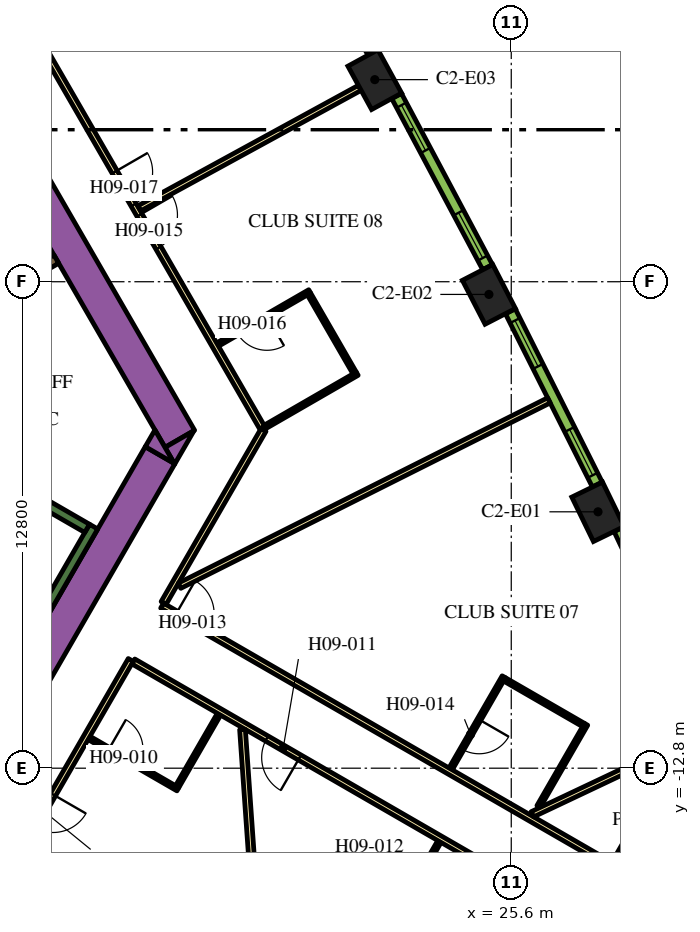
"""IFC4 building model, lengths in metres.
Left out: names, types, materials, properties, quantities, classifications, styles, units other than length and angle.
Written with IfcOpenShell. Run it as: python <this file> out.ifc"""

import sys

from ifc_helpers import new_model, si_unit, direction, frame, frame_2d, origin, origin_2d, place, context, subcontext, project, spatial, polyline, rectangle, outline, extrude, element, fill, save


model = new_model("IFC4")
c1 = context("Model", 3, precision=1e-05, world=origin(), true_north=direction((0.0, 1.0)))
c2 = subcontext(c1, "Body", "Model", "MODEL_VIEW")
j1 = project(units=[si_unit("LENGTHUNIT", "METRE"), si_unit("PLANEANGLEUNIT", "RADIAN")], contexts=[c1])
p1 = place(None, origin())
s1 = spatial("IfcSite", under=j1, at=p1, CompositionType="ELEMENT")
p2 = place(p1, origin())
s2 = spatial("IfcBuilding", under=s1, at=p2, CompositionType="ELEMENT")
p3 = place(p2, frame((0.0, 0.0, 122.7)))
s3 = spatial("IfcBuildingStorey", under=s2, at=p3, CompositionType="ELEMENT", Elevation=122.7)
p4 = place(p3, frame((29.097, -16.799, 0.0), z_axis=(0.0, 0.0, 1.0), x_axis=(0.866025403784, -0.5, 0.0)))
e1 = element("IfcColumn", 1, at=p4, inside=s3, PredefinedType="COLUMN", context=c2, shape_type="SweptSolid", body=[
    extrude(rectangle(XDim=3.0, YDim=3.0, at=origin_2d()), origin(), (0.0, 0.0, 1.0), 3.9),
])
for number, where, z_axis, x_axis in (
    (2, (27.883, -6.054, 0.0), (0.0, 0.0, 1.0), (-0.438, 0.899, 0.0)),
    (3, (25.012, -0.334, 0.0), (0.0, 0.0, 1.0), (-0.459, 0.888, 0.0)),
    (4, (22.009, 5.317, 0.0), (0.0, 0.0, 1.0), (-0.48, 0.877, 0.0)),
):
    element("IfcColumn", number, at=place(p3, frame(where, z_axis=z_axis, x_axis=x_axis)), inside=s3, PredefinedType="COLUMN", context=c2, shape_type="SweptSolid", body=[
        extrude(rectangle(XDim=1.3, YDim=0.9, at=origin_2d()), origin(), (0.0, 0.0, 1.0), 3.9),
    ])
p5 = place(p3, frame((6.776, 13.364, 0.0), z_axis=(0.0, 0.0, 1.0), x_axis=(0.500004177138, -0.8660229921, 0.0)))
e5 = element("IfcWall", 5, at=p5, inside=s3, PredefinedType="SOLIDWALL", context=c2, shape_type="SweptSolid", body=[
    extrude(rectangle(XDim=20.204, YDim=0.9, at=frame_2d((10.102, 0.0))), origin(), (0.0, 0.0, 1.0), 3.9),
])
p6 = place(p3, origin())
e6 = element("IfcWall", 6, at=p6, inside=s3, PredefinedType="SOLIDWALL", context=c2, shape_type="SweptSolid", body=[
    extrude(outline(polyline([(16.743, -4.8), (16.489, -4.36), (17.251, -3.92), (16.743, -4.8)])), origin(), (0.0, 0.0, 1.0), 3.9),
])
p7 = place(p3, frame((11.943, -12.214, 0.0), z_axis=(0.0, 0.0, 1.0), x_axis=(0.49998092645, 0.866036415623, 0.0)))
e7 = element("IfcWall", 7, at=p7, inside=s3, PredefinedType="SOLIDWALL", context=c2, shape_type="SweptSolid", body=[
    extrude(rectangle(XDim=8.83, YDim=0.9, at=frame_2d((4.415, 0.0))), origin(), (0.0, 0.0, 1.0), 3.9),
])
e8 = element("IfcWall", 8, at=p6, inside=s3, PredefinedType="SOLIDWALL", context=c2, shape_type="SweptSolid", body=[
    extrude(outline(polyline([(16.223, -3.9), (16.732, -4.78), (15.969, -4.34), (16.223, -3.9)])), origin(), (0.0, 0.0, 1.0), 3.9),
])
p8 = place(p3, frame((12.885, -9.431, 0.0), z_axis=(0.0, 0.0, 1.0), x_axis=(0.500020560727, 0.866013532718, 0.0)))
e9 = element("IfcWall", 9, at=p8, inside=s3, PredefinedType="SOLIDWALL", context=c2, shape_type="SweptSolid", body=[
    extrude(rectangle(XDim=3.45, YDim=0.25, at=frame_2d((1.725, 0.0))), origin(), (0.0, 0.0, 1.0), 3.9),
])
p9 = place(p3, frame((8.334, -2.964, 0.0), z_axis=(0.0, 0.0, 1.0), x_axis=(0.866016039709, -0.500016218704, 0.0)))
e10 = element("IfcWall", 10, at=p9, inside=s3, PredefinedType="SOLIDWALL", context=c2, shape_type="SweptSolid", body=[
    extrude(rectangle(XDim=7.05, YDim=0.25, at=frame_2d((3.525, 0.0))), origin(), (0.0, 0.0, 1.0), 3.9),
])
p10 = place(p3, frame((13.629, 0.594, 0.0), z_axis=(0.0, 0.0, 1.0), x_axis=(-0.86602790099, -0.499995674689, 0.0)))
e11 = element("IfcWall", 11, at=p10, inside=s3, PredefinedType="SOLIDWALL", context=c2, shape_type="SweptSolid", body=[
    extrude(rectangle(XDim=3.146, YDim=0.25, at=frame_2d((1.573, 0.0))), origin(), (0.0, 0.0, 1.0), 3.9),
])
p11 = place(p3, frame((16.412, -8.523, 0.0), z_axis=(0.0, 0.0, 1.0), x_axis=(0.866025629663, -0.499999608766, 0.0)))
e12 = element("IfcWall", 12, at=p11, inside=s3, PredefinedType="PARTITIONING", context=c2, shape_type="SweptSolid", body=[
    extrude(rectangle(XDim=13.624, YDim=0.15, at=frame_2d((6.812, 0.0))), origin(), (0.0, 0.0, 1.0), 2.75),
])
p12 = place(p11, frame((0.426, 0.0, 0.0)))
e13 = element("IfcOpeningElement", 13, at=p12, cuts=e12, PredefinedType="OPENING", context=c2, shape_type="SweptSolid", body=[
    extrude(rectangle(XDim=1.0, YDim=2.1, at=frame_2d((0.5, 1.05))), frame((0.0, 0.085, 0.0), z_axis=(0.0, -1.0, 0.0), x_axis=(1.0, 0.0, 0.0)), (0.0, 0.0, 1.0), 0.17),
])
p13 = place(p3, frame((19.081, -3.9, 0.0), z_axis=(0.0, 0.0, 1.0), x_axis=(-0.499974327079, -0.866040225545, 0.0)))
e14 = element("IfcWall", 14, at=p13, inside=s3, PredefinedType="PARTITIONING", context=c2, shape_type="SweptSolid", body=[
    extrude(rectangle(XDim=5.258, YDim=0.15, at=frame_2d((2.629, 0.0))), origin(), (0.0, 0.0, 1.0), 2.75),
])
p14 = place(p3, frame((6.163, 18.475, 0.0), z_axis=(0.0, 0.0, 1.0), x_axis=(0.500001317485, -0.866024643133, 0.0)))
e15 = element("IfcWall", 15, at=p14, inside=s3, PredefinedType="PARTITIONING", context=c2, shape_type="SweptSolid", body=[
    extrude(rectangle(XDim=25.767, YDim=0.15, at=frame_2d((12.883, 0.0))), origin(), (0.0, 0.0, 1.0), 2.75),
])
p15 = place(p14, frame((19.306, 0.0, 0.0)))
e16 = element("IfcOpeningElement", 16, at=p15, cuts=e15, PredefinedType="OPENING", context=c2, shape_type="SweptSolid", body=[
    extrude(rectangle(XDim=1.0, YDim=2.1, at=frame_2d((0.5, 1.05))), frame((0.0, 0.085, 0.0), z_axis=(0.0, -1.0, 0.0), x_axis=(1.0, 0.0, 0.0)), (0.0, 0.0, 1.0), 0.17),
])
p16 = place(p14, frame((17.999, 0.0, 0.0)))
e17 = element("IfcOpeningElement", 17, at=p16, cuts=e15, PredefinedType="OPENING", context=c2, shape_type="SweptSolid", body=[
    extrude(rectangle(XDim=1.0, YDim=2.1, at=frame_2d((0.5, 1.05))), frame((0.0, 0.085, 0.0), z_axis=(0.0, -1.0, 0.0), x_axis=(1.0, 0.0, 0.0)), (0.0, 0.0, 1.0), 0.17),
])
p17 = place(p14, frame((0.596, 0.0, 0.0)))
e18 = element("IfcOpeningElement", 18, at=p17, cuts=e15, PredefinedType="OPENING", context=c2, shape_type="SweptSolid", body=[
    extrude(rectangle(XDim=1.0, YDim=2.1, at=frame_2d((0.5, 1.05))), frame((0.0, 0.085, 0.0), z_axis=(0.0, -1.0, 0.0), x_axis=(1.0, 0.0, 0.0)), (0.0, 0.0, 1.0), 0.17),
])
p18 = place(p3, frame((15.587, -9.952, 0.0), z_axis=(0.0, 0.0, 1.0), x_axis=(-0.500016618951, -0.866015808616, 0.0)))
e19 = element("IfcWall", 19, at=p18, inside=s3, PredefinedType="PARTITIONING", context=c2, shape_type="SweptSolid", body=[
    extrude(rectangle(XDim=5.268, YDim=0.15, at=frame_2d((2.634, 0.0))), origin(), (0.0, 0.0, 1.0), 2.75),
])
p19 = place(p18, frame((4.088, 0.0, 0.0)))
e20 = element("IfcOpeningElement", 20, at=p19, cuts=e19, PredefinedType="OPENING", context=c2, shape_type="SweptSolid", body=[
    extrude(rectangle(XDim=1.0, YDim=2.1, at=frame_2d((0.5, 1.05))), frame((0.0, 0.085, 0.0), z_axis=(0.0, -1.0, 0.0), x_axis=(1.0, 0.0, 0.0)), (0.0, 0.0, 1.0), 0.17),
])
p20 = place(p3, frame((27.386, -16.764, 0.0), z_axis=(0.0, 0.0, 1.0), x_axis=(-0.866022585856, 0.500004880763, 0.0)))
e21 = element("IfcWall", 21, at=p20, inside=s3, PredefinedType="PARTITIONING", context=c2, shape_type="SweptSolid", body=[
    extrude(rectangle(XDim=13.544, YDim=0.15, at=frame_2d((6.772, 0.0))), origin(), (0.0, 0.0, 1.0), 2.75),
])
p21 = place(p20, frame((8.491, 0.0, 0.0)))
e22 = element("IfcOpeningElement", 22, at=p21, cuts=e21, PredefinedType="OPENING", context=c2, shape_type="SweptSolid", body=[
    extrude(rectangle(XDim=1.0, YDim=2.1, at=frame_2d((0.5, 1.05))), frame((0.0, 0.085, 0.0), z_axis=(0.0, -1.0, 0.0), x_axis=(1.0, 0.0, 0.0)), (0.0, 0.0, 1.0), 0.17),
])
p22 = place(p3, frame((21.614, 5.102, 0.0), z_axis=(0.0, 0.0, 1.0), x_axis=(-0.877484555087, -0.479604895287, 0.0)))
e23 = element("IfcWall", 23, at=p22, inside=s3, PredefinedType="PARTITIONING", context=c2, shape_type="SweptSolid", body=[
    extrude(rectangle(XDim=6.611, YDim=0.15, at=frame_2d((3.306, 0.0))), origin(), (0.0, 0.0, 1.0), 2.75),
])
p23 = place(p3, frame((26.591, -3.122, 0.0), z_axis=(0.0, 0.0, 1.0), x_axis=(-0.893766213273, -0.448533115847, 0.0)))
e24 = element("IfcWall", 24, at=p23, inside=s3, PredefinedType="PARTITIONING", context=c2, shape_type="SweptSolid", body=[
    extrude(rectangle(XDim=10.875, YDim=0.15, at=frame_2d((5.438, 0.0))), origin(), (0.0, 0.0, 1.0), 2.75),
])
p24 = place(p3, frame((19.153, -20.671, 0.0), z_axis=(0.0, 0.0, 1.0), x_axis=(-0.070070736723, 0.997542025107, 0.0)))
e25 = element("IfcWall", 25, at=p24, inside=s3, PredefinedType="PARTITIONING", context=c2, shape_type="SweptSolid", body=[
    extrude(rectangle(XDim=8.909, YDim=0.15, at=frame_2d((4.455, 0.0))), origin(), (0.0, 0.0, 1.0), 2.75),
])
p25 = place(p3, frame((30.231, -12.085, 0.0), z_axis=(0.0, 0.0, 1.0), x_axis=(-0.904001132572, -0.427530060122, 0.0)))
e26 = element("IfcWall", 26, at=p25, inside=s3, PredefinedType="PARTITIONING", context=c2, shape_type="SweptSolid", body=[
    extrude(rectangle(XDim=4.51, YDim=0.15, at=frame_2d((2.255, 0.0))), origin(), (0.0, 0.0, 1.0), 2.75),
])
p26 = place(p3, frame((14.49, -12.003, 0.0), z_axis=(0.0, 0.0, 1.0), x_axis=(0.866059108428, -0.4999416173, 0.0)))
e27 = element("IfcWall", 27, at=p26, inside=s3, PredefinedType="PARTITIONING", context=c2, shape_type="SweptSolid", body=[
    extrude(rectangle(XDim=2.7, YDim=0.1, at=frame_2d((1.35, 0.0))), origin(), (0.0, 0.0, 1.0), 2.75),
])
p27 = place(p26, frame((0.6, 0.0, 0.0)))
e28 = element("IfcOpeningElement", 28, at=p27, cuts=e27, PredefinedType="OPENING", context=c2, shape_type="SweptSolid", body=[
    extrude(rectangle(XDim=0.9, YDim=2.1, at=frame_2d((0.45, 1.05))), frame((0.0, 0.06, 0.0), z_axis=(0.0, -1.0, 0.0), x_axis=(1.0, 0.0, 0.0)), (0.0, 0.0, 1.0), 0.12),
])
p28 = place(p3, frame((16.81, -13.285, 0.0), z_axis=(0.0, 0.0, 1.0), x_axis=(0.499994660107, 0.866028486751, 0.0)))
e29 = element("IfcWall", 29, at=p28, inside=s3, PredefinedType="PARTITIONING", context=c2, shape_type="SweptSolid", body=[
    extrude(rectangle(XDim=2.2, YDim=0.1, at=frame_2d((1.1, 0.0))), origin(), (0.0, 0.0, 1.0), 2.75),
])
p29 = place(p3, frame((23.71, -14.728, 0.0), z_axis=(0.0, 0.0, 1.0), x_axis=(-0.500006934395, -0.866021400173, 0.0)))
e30 = element("IfcWall", 30, at=p29, inside=s3, PredefinedType="PARTITIONING", context=c2, shape_type="SweptSolid", body=[
    extrude(rectangle(XDim=2.6, YDim=0.1, at=frame_2d((1.3, 0.0))), origin(), (0.0, 0.0, 1.0), 2.75),
])
p30 = place(p29, frame((0.6, 0.0, 0.0)))
e31 = element("IfcOpeningElement", 31, at=p30, cuts=e30, PredefinedType="OPENING", context=c2, shape_type="SweptSolid", body=[
    extrude(rectangle(XDim=0.9, YDim=2.1, at=frame_2d((0.45, 1.05))), frame((0.0, 0.06, 0.0), z_axis=(0.0, -1.0, 0.0), x_axis=(1.0, 0.0, 0.0)), (0.0, 0.0, 1.0), 0.12),
])
p31 = place(p3, frame((25.404, -10.395, 0.0), z_axis=(0.0, 0.0, 1.0), x_axis=(-0.49998411664, -0.866034573852, 0.0)))
e32 = element("IfcWall", 32, at=p31, inside=s3, PredefinedType="PARTITIONING", context=c2, shape_type="SweptSolid", body=[
    extrude(rectangle(XDim=2.8, YDim=0.1, at=frame_2d((1.4, 0.0))), origin(), (0.0, 0.0, 1.0), 2.75),
])
p32 = place(p31, frame((1.3, 0.0, 0.0)))
e33 = element("IfcOpeningElement", 33, at=p32, cuts=e32, PredefinedType="OPENING", context=c2, shape_type="SweptSolid", body=[
    extrude(rectangle(XDim=0.9, YDim=2.1, at=frame_2d((0.45, 1.05))), frame((0.0, 0.06, 0.0), z_axis=(0.0, -1.0, 0.0), x_axis=(1.0, 0.0, 0.0)), (0.0, 0.0, 1.0), 0.12),
])
p33 = place(p3, frame((25.422, -10.463, 0.0), z_axis=(0.0, 0.0, 1.0), x_axis=(0.866024647952, -0.500001309137, 0.0)))
e34 = element("IfcWall", 34, at=p33, inside=s3, PredefinedType="PARTITIONING", context=c2, shape_type="SweptSolid", body=[
    extrude(rectangle(XDim=2.4, YDim=0.1, at=frame_2d((1.2, 0.0))), origin(), (0.0, 0.0, 1.0), 2.75),
])
p34 = place(p3, frame((26.319, -13.81, 0.0), z_axis=(0.0, 0.0, 1.0), x_axis=(0.500004234368, 0.866022959057, 0.0)))
e35 = element("IfcWall", 35, at=p34, inside=s3, PredefinedType="PARTITIONING", context=c2, shape_type="SweptSolid", body=[
    extrude(rectangle(XDim=2.5, YDim=0.1, at=frame_2d((1.25, 0.0))), origin(), (0.0, 0.0, 1.0), 2.75),
])
p35 = place(p3, frame((20.296, -0.254, 0.0), z_axis=(0.0, 0.0, 1.0), x_axis=(-0.866034573852, -0.49998411664, 0.0)))
e36 = element("IfcWall", 36, at=p35, inside=s3, PredefinedType="PARTITIONING", context=c2, shape_type="SweptSolid", body=[
    extrude(rectangle(XDim=2.8, YDim=0.1, at=frame_2d((1.4, 0.0))), origin(), (0.0, 0.0, 1.0), 2.75),
])
p36 = place(p35, frame((1.3, 0.0, 0.0)))
e37 = element("IfcOpeningElement", 37, at=p36, cuts=e36, PredefinedType="OPENING", context=c2, shape_type="SweptSolid", body=[
    extrude(rectangle(XDim=0.9, YDim=2.1, at=frame_2d((0.45, 1.05))), frame((0.0, 0.06, 0.0), z_axis=(0.0, -1.0, 0.0), x_axis=(1.0, 0.0, 0.0)), (0.0, 0.0, 1.0), 0.12),
])
p37 = place(p3, frame((20.278, -0.323, 0.0), z_axis=(0.0, 0.0, 1.0), x_axis=(0.500001309137, -0.866024647952, 0.0)))
e38 = element("IfcWall", 38, at=p37, inside=s3, PredefinedType="PARTITIONING", context=c2, shape_type="SweptSolid", body=[
    extrude(rectangle(XDim=2.4, YDim=0.1, at=frame_2d((1.2, 0.0))), origin(), (0.0, 0.0, 1.0), 2.75),
])
p38 = place(p3, frame((19.121, -3.819, 0.0), z_axis=(0.0, 0.0, 1.0), x_axis=(0.866034573852, 0.49998411664, 0.0)))
e39 = element("IfcWall", 39, at=p38, inside=s3, PredefinedType="PARTITIONING", context=c2, shape_type="SweptSolid", body=[
    extrude(rectangle(XDim=2.8, YDim=0.1, at=frame_2d((1.4, 0.0))), origin(), (0.0, 0.0, 1.0), 2.75),
])
p39 = place(p3, frame((30.62, -11.127, 0.0), z_axis=(0.0, 0.0, 1.0), x_axis=(-0.427543726596, 0.903994669148, 0.0)))
e40 = element("IfcWall", 40, at=p39, inside=s3, PredefinedType="SOLIDWALL", context=c2, shape_type="SweptSolid", body=[
    extrude(rectangle(XDim=5.107, YDim=0.29, at=frame_2d((2.553, 0.0))), origin(), (0.0, 0.0, 1.0), 3.65),
])
p40 = place(p39, frame((0.24, 0.0, 0.9)))
e41 = element("IfcOpeningElement", 41, at=p40, cuts=e40, PredefinedType="OPENING", context=c2, shape_type="SweptSolid", body=[
    extrude(rectangle(XDim=1.35, YDim=2.15, at=frame_2d((0.675, 1.075))), frame((0.0, 0.155, 0.0), z_axis=(0.0, -1.0, 0.0), x_axis=(1.0, 0.0, 0.0)), (0.0, 0.0, 1.0), 0.31),
])
p41 = place(p39, frame((3.471, 0.0, 0.9)))
e42 = element("IfcOpeningElement", 42, at=p41, cuts=e40, PredefinedType="OPENING", context=c2, shape_type="SweptSolid", body=[
    extrude(rectangle(XDim=1.35, YDim=2.15, at=frame_2d((0.675, 1.075))), frame((0.0, 0.155, 0.0), z_axis=(0.0, -1.0, 0.0), x_axis=(1.0, 0.0, 0.0)), (0.0, 0.0, 1.0), 0.31),
])
p42 = place(p3, frame((27.864, -5.336, 0.0), z_axis=(0.0, 0.0, 1.0), x_axis=(-0.448534297211, 0.893765620409, 0.0)))
e43 = element("IfcWall", 43, at=p42, inside=s3, PredefinedType="SOLIDWALL", context=c2, shape_type="SweptSolid", body=[
    extrude(rectangle(XDim=5.1, YDim=0.29, at=frame_2d((2.55, 0.0))), origin(), (0.0, 0.0, 1.0), 3.65),
])
p43 = place(p42, frame((0.272, 0.0, 0.9)))
e44 = element("IfcOpeningElement", 44, at=p43, cuts=e43, PredefinedType="OPENING", context=c2, shape_type="SweptSolid", body=[
    extrude(rectangle(XDim=1.35, YDim=2.15, at=frame_2d((0.675, 1.075))), frame((0.0, 0.155, 0.0), z_axis=(0.0, -1.0, 0.0), x_axis=(1.0, 0.0, 0.0)), (0.0, 0.0, 1.0), 0.31),
])
p44 = place(p42, frame((3.478, 0.0, 0.9)))
e45 = element("IfcOpeningElement", 45, at=p44, cuts=e43, PredefinedType="OPENING", context=c2, shape_type="SweptSolid", body=[
    extrude(rectangle(XDim=1.35, YDim=2.15, at=frame_2d((0.675, 1.075))), frame((0.0, 0.155, 0.0), z_axis=(0.0, -1.0, 0.0), x_axis=(1.0, 0.0, 0.0)), (0.0, 0.0, 1.0), 0.31),
])
p45 = place(p3, frame((24.977, 0.383, 0.0), z_axis=(0.0, 0.0, 1.0), x_axis=(-0.469323203119, 0.883026461106, 0.0)))
e46 = element("IfcWall", 46, at=p45, inside=s3, PredefinedType="SOLIDWALL", context=c2, shape_type="SweptSolid", body=[
    extrude(rectangle(XDim=5.101, YDim=0.29, at=frame_2d((2.55, 0.0))), origin(), (0.0, 0.0, 1.0), 3.65),
])
p46 = place(p45, frame((0.273, 0.0, 0.9)))
e47 = element("IfcOpeningElement", 47, at=p46, cuts=e46, PredefinedType="OPENING", context=c2, shape_type="SweptSolid", body=[
    extrude(rectangle(XDim=1.35, YDim=2.15, at=frame_2d((0.675, 1.075))), frame((0.0, 0.155, 0.0), z_axis=(0.0, -1.0, 0.0), x_axis=(1.0, 0.0, 0.0)), (0.0, 0.0, 1.0), 0.31),
])
p47 = place(p45, frame((3.478, 0.0, 0.9)))
e48 = element("IfcOpeningElement", 48, at=p47, cuts=e46, PredefinedType="OPENING", context=c2, shape_type="SweptSolid", body=[
    extrude(rectangle(XDim=1.35, YDim=2.15, at=frame_2d((0.675, 1.075))), frame((0.0, 0.155, 0.0), z_axis=(0.0, -1.0, 0.0), x_axis=(1.0, 0.0, 0.0)), (0.0, 0.0, 1.0), 0.31),
])
p48 = place(p3, frame((21.956, 6.033, 0.0), z_axis=(0.0, 0.0, 1.0), x_axis=(-0.48983164787, 0.87181704316, 0.0)))
e49 = element("IfcWall", 49, at=p48, inside=s3, PredefinedType="SOLIDWALL", context=c2, shape_type="SweptSolid", body=[
    extrude(rectangle(XDim=5.1, YDim=0.29, at=frame_2d((2.55, 0.0))), origin(), (0.0, 0.0, 1.0), 3.65),
])
p49 = place(p48, frame((0.273, 0.0, 0.9)))
e50 = element("IfcOpeningElement", 50, at=p49, cuts=e49, PredefinedType="OPENING", context=c2, shape_type="SweptSolid", body=[
    extrude(rectangle(XDim=1.35, YDim=2.15, at=frame_2d((0.675, 1.075))), frame((0.0, 0.155, 0.0), z_axis=(0.0, -1.0, 0.0), x_axis=(1.0, 0.0, 0.0)), (0.0, 0.0, 1.0), 0.31),
])
p50 = place(p48, frame((3.478, 0.0, 0.9)))
e51 = element("IfcOpeningElement", 51, at=p50, cuts=e49, PredefinedType="OPENING", context=c2, shape_type="SweptSolid", body=[
    extrude(rectangle(XDim=1.35, YDim=2.15, at=frame_2d((0.675, 1.075))), frame((0.0, 0.155, 0.0), z_axis=(0.0, -1.0, 0.0), x_axis=(1.0, 0.0, 0.0)), (0.0, 0.0, 1.0), 0.31),
])
p51 = place(p19, origin())
e52 = element("IfcDoor", 52, at=p51, inside=s3, OperationType="SINGLE_SWING_RIGHT", PredefinedType="DOOR", context=c2, shape_type="SweptSolid", body=[
    extrude(rectangle(XDim=1.0, YDim=2.1, at=frame_2d((0.5, 1.05))), frame((0.0, 0.025, 0.0), z_axis=(0.0, -1.0, 0.0), x_axis=(1.0, 0.0, 0.0)), (0.0, 0.0, 1.0), 0.05),
])
fill(e20, e52)
p52 = place(p27, origin())
e53 = element("IfcDoor", 53, at=p52, inside=s3, OperationType="SINGLE_SWING_LEFT", PredefinedType="DOOR", context=c2, shape_type="SweptSolid", body=[
    extrude(rectangle(XDim=0.9, YDim=2.1, at=frame_2d((0.45, 1.05))), frame((0.0, 0.025, 0.0), z_axis=(0.0, -1.0, 0.0), x_axis=(1.0, 0.0, 0.0)), (0.0, 0.0, 1.0), 0.05),
])
fill(e28, e53)
p53 = place(p21, origin())
e54 = element("IfcDoor", 54, at=p53, inside=s3, OperationType="SINGLE_SWING_RIGHT", PredefinedType="DOOR", context=c2, shape_type="SweptSolid", body=[
    extrude(rectangle(XDim=1.0, YDim=2.1, at=frame_2d((0.5, 1.05))), frame((0.0, 0.025, 0.0), z_axis=(0.0, -1.0, 0.0), x_axis=(1.0, 0.0, 0.0)), (0.0, 0.0, 1.0), 0.05),
])
fill(e22, e54)
p54 = place(p12, origin())
e55 = element("IfcDoor", 55, at=p54, inside=s3, OperationType="SINGLE_SWING_LEFT", PredefinedType="DOOR", context=c2, shape_type="SweptSolid", body=[
    extrude(rectangle(XDim=1.0, YDim=2.1, at=frame_2d((0.5, 1.05))), frame((0.0, 0.025, 0.0), z_axis=(0.0, -1.0, 0.0), x_axis=(1.0, 0.0, 0.0)), (0.0, 0.0, 1.0), 0.05),
])
fill(e13, e55)
p55 = place(p32, origin())
e56 = element("IfcDoor", 56, at=p55, inside=s3, OperationType="SINGLE_SWING_LEFT", PredefinedType="DOOR", context=c2, shape_type="SweptSolid", body=[
    extrude(rectangle(XDim=0.9, YDim=2.1, at=frame_2d((0.45, 1.05))), frame((0.0, 0.025, 0.0), z_axis=(0.0, -1.0, 0.0), x_axis=(1.0, 0.0, 0.0)), (0.0, 0.0, 1.0), 0.05),
])
fill(e33, e56)
p56 = place(p15, origin())
e57 = element("IfcDoor", 57, at=p56, inside=s3, OperationType="SINGLE_SWING_LEFT", PredefinedType="DOOR", context=c2, shape_type="SweptSolid", body=[
    extrude(rectangle(XDim=1.0, YDim=2.1, at=frame_2d((0.5, 1.05))), frame((0.0, 0.025, 0.0), z_axis=(0.0, -1.0, 0.0), x_axis=(1.0, 0.0, 0.0)), (0.0, 0.0, 1.0), 0.05),
])
fill(e16, e57)
p57 = place(p36, origin())
e58 = element("IfcDoor", 58, at=p57, inside=s3, OperationType="SINGLE_SWING_LEFT", PredefinedType="DOOR", context=c2, shape_type="SweptSolid", body=[
    extrude(rectangle(XDim=0.9, YDim=2.1, at=frame_2d((0.45, 1.05))), frame((0.0, 0.025, 0.0), z_axis=(0.0, -1.0, 0.0), x_axis=(1.0, 0.0, 0.0)), (0.0, 0.0, 1.0), 0.05),
])
fill(e37, e58)
p58 = place(p16, origin())
e59 = element("IfcDoor", 59, at=p58, inside=s3, OperationType="SINGLE_SWING_RIGHT", PredefinedType="DOOR", context=c2, shape_type="SweptSolid", body=[
    extrude(rectangle(XDim=1.0, YDim=2.1, at=frame_2d((0.5, 1.05))), frame((0.0, 0.025, 0.0), z_axis=(0.0, -1.0, 0.0), x_axis=(1.0, 0.0, 0.0)), (0.0, 0.0, 1.0), 0.05),
])
fill(e17, e59)
p59 = place(p43, origin())
e60 = element("IfcWindow", 60, at=p59, inside=s3, PartitioningType="DOUBLE_PANEL_VERTICAL", PredefinedType="WINDOW", context=c2, shape_type="SweptSolid", body=[
    extrude(rectangle(XDim=1.35, YDim=2.15, at=frame_2d((0.675, 1.075))), frame((0.0, 0.015, 0.0), z_axis=(0.0, -1.0, 0.0), x_axis=(1.0, 0.0, 0.0)), (0.0, 0.0, 1.0), 0.06),
])
fill(e44, e60)
p60 = place(p44, origin())
e61 = element("IfcWindow", 61, at=p60, inside=s3, PartitioningType="DOUBLE_PANEL_VERTICAL", PredefinedType="WINDOW", context=c2, shape_type="SweptSolid", body=[
    extrude(rectangle(XDim=1.35, YDim=2.15, at=frame_2d((0.675, 1.075))), frame((0.0, 0.015, 0.0), z_axis=(0.0, -1.0, 0.0), x_axis=(1.0, 0.0, 0.0)), (0.0, 0.0, 1.0), 0.06),
])
fill(e45, e61)
p61 = place(p46, origin())
e62 = element("IfcWindow", 62, at=p61, inside=s3, PartitioningType="DOUBLE_PANEL_VERTICAL", PredefinedType="WINDOW", context=c2, shape_type="SweptSolid", body=[
    extrude(rectangle(XDim=1.35, YDim=2.15, at=frame_2d((0.675, 1.075))), frame((0.0, 0.015, 0.0), z_axis=(0.0, -1.0, 0.0), x_axis=(1.0, 0.0, 0.0)), (0.0, 0.0, 1.0), 0.06),
])
fill(e47, e62)
p62 = place(p47, origin())
e63 = element("IfcWindow", 63, at=p62, inside=s3, PartitioningType="DOUBLE_PANEL_VERTICAL", PredefinedType="WINDOW", context=c2, shape_type="SweptSolid", body=[
    extrude(rectangle(XDim=1.35, YDim=2.15, at=frame_2d((0.675, 1.075))), frame((0.0, 0.015, 0.0), z_axis=(0.0, -1.0, 0.0), x_axis=(1.0, 0.0, 0.0)), (0.0, 0.0, 1.0), 0.06),
])
fill(e48, e63)
save(model, sys.argv[1])
